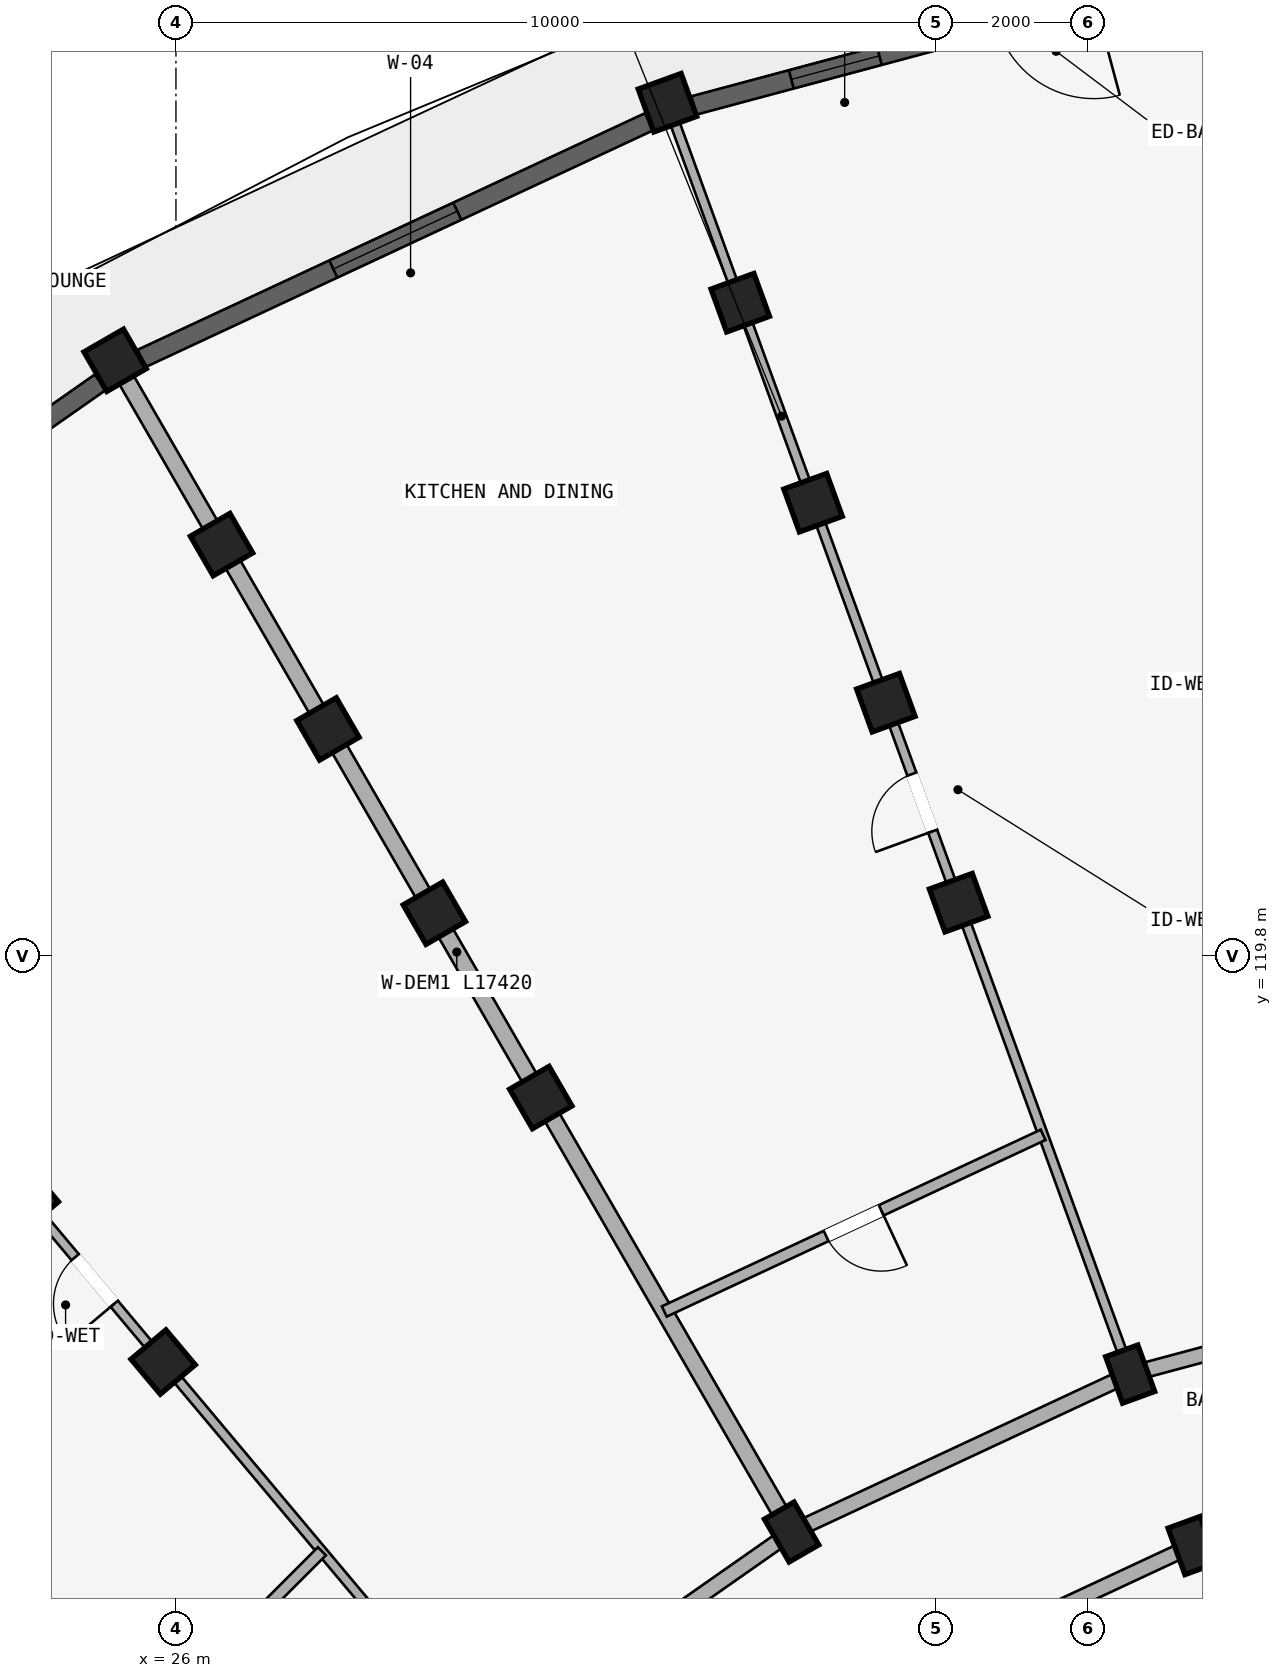
"""IFC4 building model, lengths in metres.
Left out: names, types, materials, properties, quantities, classifications, styles, units other than length and angle.
Written with IfcOpenShell. Run it as: python <this file> out.ifc"""

import sys

from ifc_helpers import new_model, si_unit, direction, frame, frame_2d, origin, origin_2d, place, context, subcontext, project, spatial, rectangle, extrude, element, fill, save


model = new_model("IFC4")
c1 = context("Model", 3, precision=1e-05, world=origin(), true_north=direction((0.0, 1.0)))
c2 = subcontext(c1, "Body", "Model", "MODEL_VIEW")
j1 = project(units=[si_unit("LENGTHUNIT", "METRE"), si_unit("PLANEANGLEUNIT", "RADIAN")], contexts=[c1])
p1 = place(None, origin())
s1 = spatial("IfcSite", under=j1, at=p1, CompositionType="ELEMENT")
p2 = place(p1, origin())
s2 = spatial("IfcBuilding", under=s1, at=p2, CompositionType="ELEMENT")
p3 = place(p2, frame((0.0, 0.0, 33.9)))
s3 = spatial("IfcBuildingStorey", under=s2, at=p3, CompositionType="ELEMENT", Elevation=33.9)
for number, where, z_axis, x_axis in (
    (1, (39.376, 112.044, 0.0), (0.0, 0.0, 1.0), (0.94, 0.342, 0.0)),
    (2, (38.555, 114.299, 0.0), (0.0, 0.0, 1.0), (0.94, 0.342, 0.0)),
):
    element("IfcColumn", number, at=place(p3, frame(where, z_axis=z_axis, x_axis=x_axis)), inside=s3, PredefinedType="COLUMN", context=c2, shape_type="SweptSolid", body=[
        extrude(rectangle(XDim=0.45, YDim=0.65, at=origin_2d()), origin(), (0.0, 0.0, 1.0), 2.93),
    ])
for number, where, z_axis, x_axis in (
    (3, (36.298, 120.501, 0.0), (0.0, 0.0, 1.0), (0.94, 0.342, 0.0)),
    (4, (35.34, 123.132, 0.0), (0.0, 0.0, 1.0), (0.94, 0.342, 0.0)),
    (5, (34.382, 125.764, 0.0), (0.0, 0.0, 1.0), (0.94, 0.342, 0.0)),
    (6, (33.425, 128.395, 0.0), (0.0, 0.0, 1.0), (0.94, 0.342, 0.0)),
    (7, (32.467, 131.026, 0.0), (0.0, 0.0, 1.0), (0.94, 0.342, 0.0)),
):
    element("IfcColumn", number, at=place(p3, frame(where, z_axis=z_axis, x_axis=x_axis)), inside=s3, PredefinedType="COLUMN", context=c2, shape_type="SweptSolid", body=[
        extrude(rectangle(XDim=0.6, YDim=0.6, at=origin_2d()), origin(), (0.0, 0.0, 1.0), 2.93),
    ])
p4 = place(p3, frame((34.1, 112.222, 0.0), z_axis=(0.0, 0.0, 1.0), x_axis=(0.866025403784, 0.5, 0.0)))
e8 = element("IfcColumn", 8, at=p4, inside=s3, PredefinedType="COLUMN", context=c2, shape_type="SweptSolid", body=[
    extrude(rectangle(XDim=0.45, YDim=0.65, at=origin_2d()), origin(), (0.0, 0.0, 1.0), 2.93),
])
for number, where, z_axis, x_axis in (
    (9, (30.8, 117.938, 0.0), (0.0, 0.0, 1.0), (0.866, 0.5, 0.0)),
    (10, (29.4, 120.363, 0.0), (0.0, 0.0, 1.0), (0.866, 0.5, 0.0)),
    (11, (28.0, 122.787, 0.0), (0.0, 0.0, 1.0), (0.866, 0.5, 0.0)),
    (12, (26.6, 125.212, 0.0), (0.0, 0.0, 1.0), (0.866, 0.5, 0.0)),
    (13, (25.2, 127.637, 0.0), (0.0, 0.0, 1.0), (0.866, 0.5, 0.0)),
    (14, (25.831, 114.458, 0.0), (0.0, 0.0, 1.0), (0.766, 0.643, 0.0)),
    (15, (24.031, 116.603, 0.0), (0.0, 0.0, 1.0), (0.766, 0.643, 0.0)),
):
    element("IfcColumn", number, at=place(p3, frame(where, z_axis=z_axis, x_axis=x_axis)), inside=s3, PredefinedType="COLUMN", context=c2, shape_type="SweptSolid", body=[
        extrude(rectangle(XDim=0.6, YDim=0.6, at=origin_2d()), origin(), (0.0, 0.0, 1.0), 2.93),
    ])
p5 = place(p3, frame((43.72, 113.208, 0.0), z_axis=(0.0, 0.0, 1.0), x_axis=(-0.965934240054, -0.258787642463, 0.0)))
e16 = element("IfcWall", 16, at=p5, inside=s3, PredefinedType="STANDARD", context=c2, shape_type="SweptSolid", body=[
    extrude(rectangle(XDim=4.497, YDim=0.2, at=frame_2d((2.249, 0.0))), origin(), (0.0, 0.0, 1.0), 2.372),
])
p6 = place(p5, frame((1.709, 0.0, 0.0)))
e17 = element("IfcOpeningElement", 17, at=p6, cuts=e16, PredefinedType="OPENING", context=c2, shape_type="SweptSolid", body=[
    extrude(rectangle(XDim=1.08, YDim=2.15, at=frame_2d((0.54, 1.075))), frame((0.0, 0.11, 0.0), z_axis=(0.0, -1.0, 0.0), x_axis=(1.0, 0.0, 0.0)), (0.0, 0.0, 1.0), 0.22),
])
p7 = place(p3, frame((43.303, 115.572, 0.0), z_axis=(0.0, 0.0, 1.0), x_axis=(-0.965930095386, -0.258803112091, 0.0)))
e18 = element("IfcWall", 18, at=p7, inside=s3, PredefinedType="STANDARD", context=c2, shape_type="SweptSolid", body=[
    extrude(rectangle(XDim=4.916, YDim=0.2, at=frame_2d((2.458, 0.0))), origin(), (0.0, 0.0, 1.0), 2.372),
])
p8 = place(p3, frame((39.376, 112.044, 0.0), z_axis=(0.0, 0.0, 1.0), x_axis=(-0.906307919131, -0.422617978463, 0.0)))
e19 = element("IfcWall", 19, at=p8, inside=s3, PredefinedType="STANDARD", context=c2, shape_type="SweptSolid", body=[
    extrude(rectangle(XDim=4.497, YDim=0.2, at=frame_2d((2.249, 0.0))), origin(), (0.0, 0.0, 1.0), 2.372),
])
p9 = place(p3, frame((38.555, 114.299, 0.0), z_axis=(0.0, 0.0, 1.0), x_axis=(-0.906302381024, -0.422629854778, 0.0)))
e20 = element("IfcWall", 20, at=p9, inside=s3, PredefinedType="STANDARD", context=c2, shape_type="SweptSolid", body=[
    extrude(rectangle(XDim=4.915, YDim=0.2, at=frame_2d((2.458, 0.0))), origin(), (0.0, 0.0, 1.0), 2.372),
])
p10 = place(p3, frame((34.1, 112.222, 0.0), z_axis=(0.0, 0.0, 1.0), x_axis=(-0.819140911474, -0.573592335331, 0.0)))
e21 = element("IfcWall", 21, at=p10, inside=s3, PredefinedType="STANDARD", context=c2, shape_type="SweptSolid", body=[
    extrude(rectangle(XDim=4.916, YDim=0.2, at=frame_2d((2.458, 0.0))), origin(), (0.0, 0.0, 1.0), 2.372),
])
p11 = place(p10, frame((1.938, 0.0, 0.0)))
e22 = element("IfcOpeningElement", 22, at=p11, cuts=e21, PredefinedType="OPENING", context=c2, shape_type="SweptSolid", body=[
    extrude(rectangle(XDim=1.04, YDim=2.15, at=frame_2d((0.52, 1.075))), frame((0.0, 0.11, 0.0), z_axis=(0.0, -1.0, 0.0), x_axis=(1.0, 0.0, 0.0)), (0.0, 0.0, 1.0), 0.22),
])
p12 = place(p3, frame((38.521, 114.393, 0.0), z_axis=(0.0, 0.0, 1.0), x_axis=(-0.342022120477, 0.939691901159, 0.0)))
e23 = element("IfcWall", 23, at=p12, inside=s3, PredefinedType="PARTITIONING", context=c2, shape_type="SweptSolid", body=[
    extrude(rectangle(XDim=17.42, YDim=0.125, at=frame_2d((8.71, 0.0))), origin(), (0.0, 0.0, 1.0), 2.372),
])
p13 = place(p12, frame((7.5, 0.0, 0.0)))
e24 = element("IfcOpeningElement", 24, at=p13, cuts=e23, PredefinedType="OPENING", context=c2, shape_type="SweptSolid", body=[
    extrude(rectangle(XDim=0.8, YDim=2.1, at=frame_2d((0.4, 1.05))), frame((0.0, 0.073, 0.0), z_axis=(0.0, -1.0, 0.0), x_axis=(1.0, 0.0, 0.0)), (0.0, 0.0, 1.0), 0.145),
])
p14 = place(p3, frame((34.05, 112.309, 0.0), z_axis=(0.0, 0.0, 1.0), x_axis=(-0.499997843263, 0.866026648973, 0.0)))
e25 = element("IfcWall", 25, at=p14, inside=s3, PredefinedType="STANDARD", context=c2, shape_type="SweptSolid", body=[
    extrude(rectangle(XDim=17.42, YDim=0.22, at=frame_2d((8.71, 0.0))), origin(), (0.0, 0.0, 1.0), 2.372),
])
p15 = place(p3, frame((30.009, 109.479, 0.0), z_axis=(0.0, 0.0, 1.0), x_axis=(-0.642784757967, 0.766046835987, 0.0)))
e26 = element("IfcWall", 26, at=p15, inside=s3, PredefinedType="PARTITIONING", context=c2, shape_type="SweptSolid", body=[
    extrude(rectangle(XDim=17.42, YDim=0.125, at=frame_2d((8.71, 0.0))), origin(), (0.0, 0.0, 1.0), 2.372),
])
p16 = place(p15, frame((7.5, 0.0, 0.0)))
e27 = element("IfcOpeningElement", 27, at=p16, cuts=e26, PredefinedType="OPENING", context=c2, shape_type="SweptSolid", body=[
    extrude(rectangle(XDim=0.8, YDim=2.1, at=frame_2d((0.4, 1.05))), frame((0.0, 0.073, 0.0), z_axis=(0.0, -1.0, 0.0), x_axis=(1.0, 0.0, 0.0)), (0.0, 0.0, 1.0), 0.145),
])
p17 = place(p3, frame((26.521, 105.991, 0.0), z_axis=(0.0, 0.0, 1.0), x_axis=(-0.766046835987, 0.642784757967, 0.0)))
e28 = element("IfcWall", 28, at=p17, inside=s3, PredefinedType="STANDARD", context=c2, shape_type="SweptSolid", body=[
    extrude(rectangle(XDim=17.42, YDim=0.22, at=frame_2d((8.71, 0.0))), origin(), (0.0, 0.0, 1.0), 2.372),
])
p18 = place(p3, frame((37.409, 117.447, 0.0), z_axis=(0.0, 0.0, 1.0), x_axis=(-0.906302189986, -0.422630264446, 0.0)))
e29 = element("IfcWall", 29, at=p18, inside=s3, PredefinedType="PLUMBINGWALL", context=c2, shape_type="SweptSolid", body=[
    extrude(rectangle(XDim=5.5, YDim=0.15, at=frame_2d((2.75, 0.0))), origin(), (0.0, 0.0, 1.0), 2.372),
])
p19 = place(p18, frame((2.35, 0.0, 0.0)))
e30 = element("IfcOpeningElement", 30, at=p19, cuts=e29, PredefinedType="OPENING", context=c2, shape_type="SweptSolid", body=[
    extrude(rectangle(XDim=0.8, YDim=2.1, at=frame_2d((0.4, 1.05))), frame((0.0, 0.085, 0.0), z_axis=(0.0, -1.0, 0.0), x_axis=(1.0, 0.0, 0.0)), (0.0, 0.0, 1.0), 0.17),
])
p20 = place(p3, frame((27.92, 111.969, 0.0), z_axis=(0.0, 0.0, 1.0), x_axis=(-0.707106781187, -0.707106781187, 0.0)))
e31 = element("IfcWall", 31, at=p20, inside=s3, PredefinedType="PLUMBINGWALL", context=c2, shape_type="SweptSolid", body=[
    extrude(rectangle(XDim=5.5, YDim=0.15, at=frame_2d((2.75, 0.0))), origin(), (0.0, 0.0, 1.0), 2.372),
])
p21 = place(p20, frame((2.37, 0.0, 0.0)))
e32 = element("IfcOpeningElement", 32, at=p21, cuts=e31, PredefinedType="OPENING", context=c2, shape_type="SweptSolid", body=[
    extrude(rectangle(XDim=0.76, YDim=2.05, at=frame_2d((0.38, 1.025))), frame((0.0, 0.085, 0.0), z_axis=(0.0, -1.0, 0.0), x_axis=(1.0, 0.0, 0.0)), (0.0, 0.0, 1.0), 0.17),
])
p22 = place(p3, frame((39.93, 132.896, 0.0), z_axis=(0.0, 0.0, 1.0), x_axis=(-0.965925122991, -0.258821669831, 0.0)))
e33 = element("IfcWall", 33, at=p22, inside=s3, PredefinedType="STANDARD", context=c2, shape_type="SweptSolid", body=[
    extrude(rectangle(XDim=7.367, YDim=0.25, at=frame_2d((3.684, 0.0))), origin(), (0.0, 0.0, 1.0), 2.472),
])
p23 = place(p22, frame((4.84, 0.0, 0.422)))
e34 = element("IfcOpeningElement", 34, at=p23, cuts=e33, PredefinedType="OPENING", context=c2, shape_type="SweptSolid", body=[
    extrude(rectangle(XDim=1.2, YDim=1.5, at=frame_2d((0.6, 0.75))), frame((0.0, 0.135, 0.0), z_axis=(0.0, -1.0, 0.0), x_axis=(1.0, 0.0, 0.0)), (0.0, 0.0, 1.0), 0.27),
])
p24 = place(p22, frame((1.918, 0.0, 0.0)))
e35 = element("IfcOpeningElement", 35, at=p24, cuts=e33, PredefinedType="OPENING", context=c2, shape_type="SweptSolid", body=[
    extrude(rectangle(XDim=1.32, YDim=2.15, at=frame_2d((0.66, 1.075))), frame((0.0, 0.135, 0.0), z_axis=(0.0, -1.0, 0.0), x_axis=(1.0, 0.0, 0.0)), (0.0, 0.0, 1.0), 0.27),
])
p25 = place(p3, frame((32.225, 130.775, 0.0), z_axis=(0.0, 0.0, 1.0), x_axis=(-0.906321090675, -0.422589730823, 0.0)))
e36 = element("IfcWall", 36, at=p25, inside=s3, PredefinedType="STANDARD", context=c2, shape_type="SweptSolid", body=[
    extrude(rectangle(XDim=7.367, YDim=0.25, at=frame_2d((3.684, 0.0))), origin(), (0.0, 0.0, 1.0), 2.472),
])
p26 = place(p25, frame((2.783, 0.0, 0.622)))
e37 = element("IfcOpeningElement", 37, at=p26, cuts=e36, PredefinedType="OPENING", context=c2, shape_type="SweptSolid", body=[
    extrude(rectangle(XDim=1.8, YDim=1.65, at=frame_2d((0.9, 0.825))), frame((0.0, 0.135, 0.0), z_axis=(0.0, -1.0, 0.0), x_axis=(1.0, 0.0, 0.0)), (0.0, 0.0, 1.0), 0.27),
])
p27 = place(p3, frame((25.005, 127.348, 0.0), z_axis=(0.0, 0.0, 1.0), x_axis=(-0.819147839112, -0.573582441919, 0.0)))
e38 = element("IfcWall", 38, at=p27, inside=s3, PredefinedType="STANDARD", context=c2, shape_type="SweptSolid", body=[
    extrude(rectangle(XDim=7.367, YDim=0.25, at=frame_2d((3.684, 0.0))), origin(), (0.0, 0.0, 1.0), 2.472),
])
p28 = place(p27, frame((2.858, 0.0, 0.522)))
e39 = element("IfcOpeningElement", 39, at=p28, cuts=e38, PredefinedType="OPENING", context=c2, shape_type="SweptSolid", body=[
    extrude(rectangle(XDim=1.65, YDim=1.75, at=frame_2d((0.825, 0.875))), frame((0.0, 0.135, 0.0), z_axis=(0.0, -1.0, 0.0), x_axis=(1.0, 0.0, 0.0)), (0.0, 0.0, 1.0), 0.27),
])
p29 = place(p23, origin())
e40 = element("IfcWindow", 40, at=p29, inside=s3, PartitioningType="SINGLE_PANEL", PredefinedType="WINDOW", context=c2, shape_type="SweptSolid", body=[
    extrude(rectangle(XDim=1.2, YDim=1.5, at=frame_2d((0.6, 0.75))), frame((0.0, 0.03, 0.0), z_axis=(0.0, -1.0, 0.0), x_axis=(1.0, 0.0, 0.0)), (0.0, 0.0, 1.0), 0.06),
])
fill(e34, e40)
p30 = place(p26, origin())
e41 = element("IfcWindow", 41, at=p30, inside=s3, PartitioningType="DOUBLE_PANEL_VERTICAL", PredefinedType="WINDOW", context=c2, shape_type="SweptSolid", body=[
    extrude(rectangle(XDim=1.8, YDim=1.65, at=frame_2d((0.9, 0.825))), frame((0.0, 0.03, 0.0), z_axis=(0.0, -1.0, 0.0), x_axis=(1.0, 0.0, 0.0)), (0.0, 0.0, 1.0), 0.06),
])
fill(e37, e41)
p31 = place(p13, origin())
e42 = element("IfcDoor", 42, at=p31, inside=s3, OperationType="SINGLE_SWING_LEFT", PredefinedType="DOOR", context=c2, shape_type="SweptSolid", body=[
    extrude(rectangle(XDim=0.8, YDim=2.1, at=frame_2d((0.4, 1.05))), frame((0.0, 0.025, 0.0), z_axis=(0.0, -1.0, 0.0), x_axis=(1.0, 0.0, 0.0)), (0.0, 0.0, 1.0), 0.05),
])
fill(e24, e42)
p32 = place(p16, frame((0.8, 0.0, 0.0), z_axis=(0.0, 0.0, 1.0), x_axis=(-1.0, 0.0, 0.0)))
e43 = element("IfcDoor", 43, at=p32, inside=s3, OperationType="SINGLE_SWING_RIGHT", PredefinedType="DOOR", context=c2, shape_type="SweptSolid", body=[
    extrude(rectangle(XDim=0.8, YDim=2.1, at=frame_2d((0.4, 1.05))), frame((0.0, 0.025, 0.0), z_axis=(0.0, -1.0, 0.0), x_axis=(1.0, 0.0, 0.0)), (0.0, 0.0, 1.0), 0.05),
])
fill(e27, e43)
p33 = place(p19, frame((0.8, 0.0, 0.0), z_axis=(0.0, 0.0, 1.0), x_axis=(-1.0, 0.0, 0.0)))
e44 = element("IfcDoor", 44, at=p33, inside=s3, OperationType="SINGLE_SWING_RIGHT", PredefinedType="DOOR", context=c2, shape_type="SweptSolid", body=[
    extrude(rectangle(XDim=0.8, YDim=2.1, at=frame_2d((0.4, 1.05))), frame((0.0, 0.025, 0.0), z_axis=(0.0, -1.0, 0.0), x_axis=(1.0, 0.0, 0.0)), (0.0, 0.0, 1.0), 0.05),
])
fill(e30, e44)
save(model, sys.argv[1])
